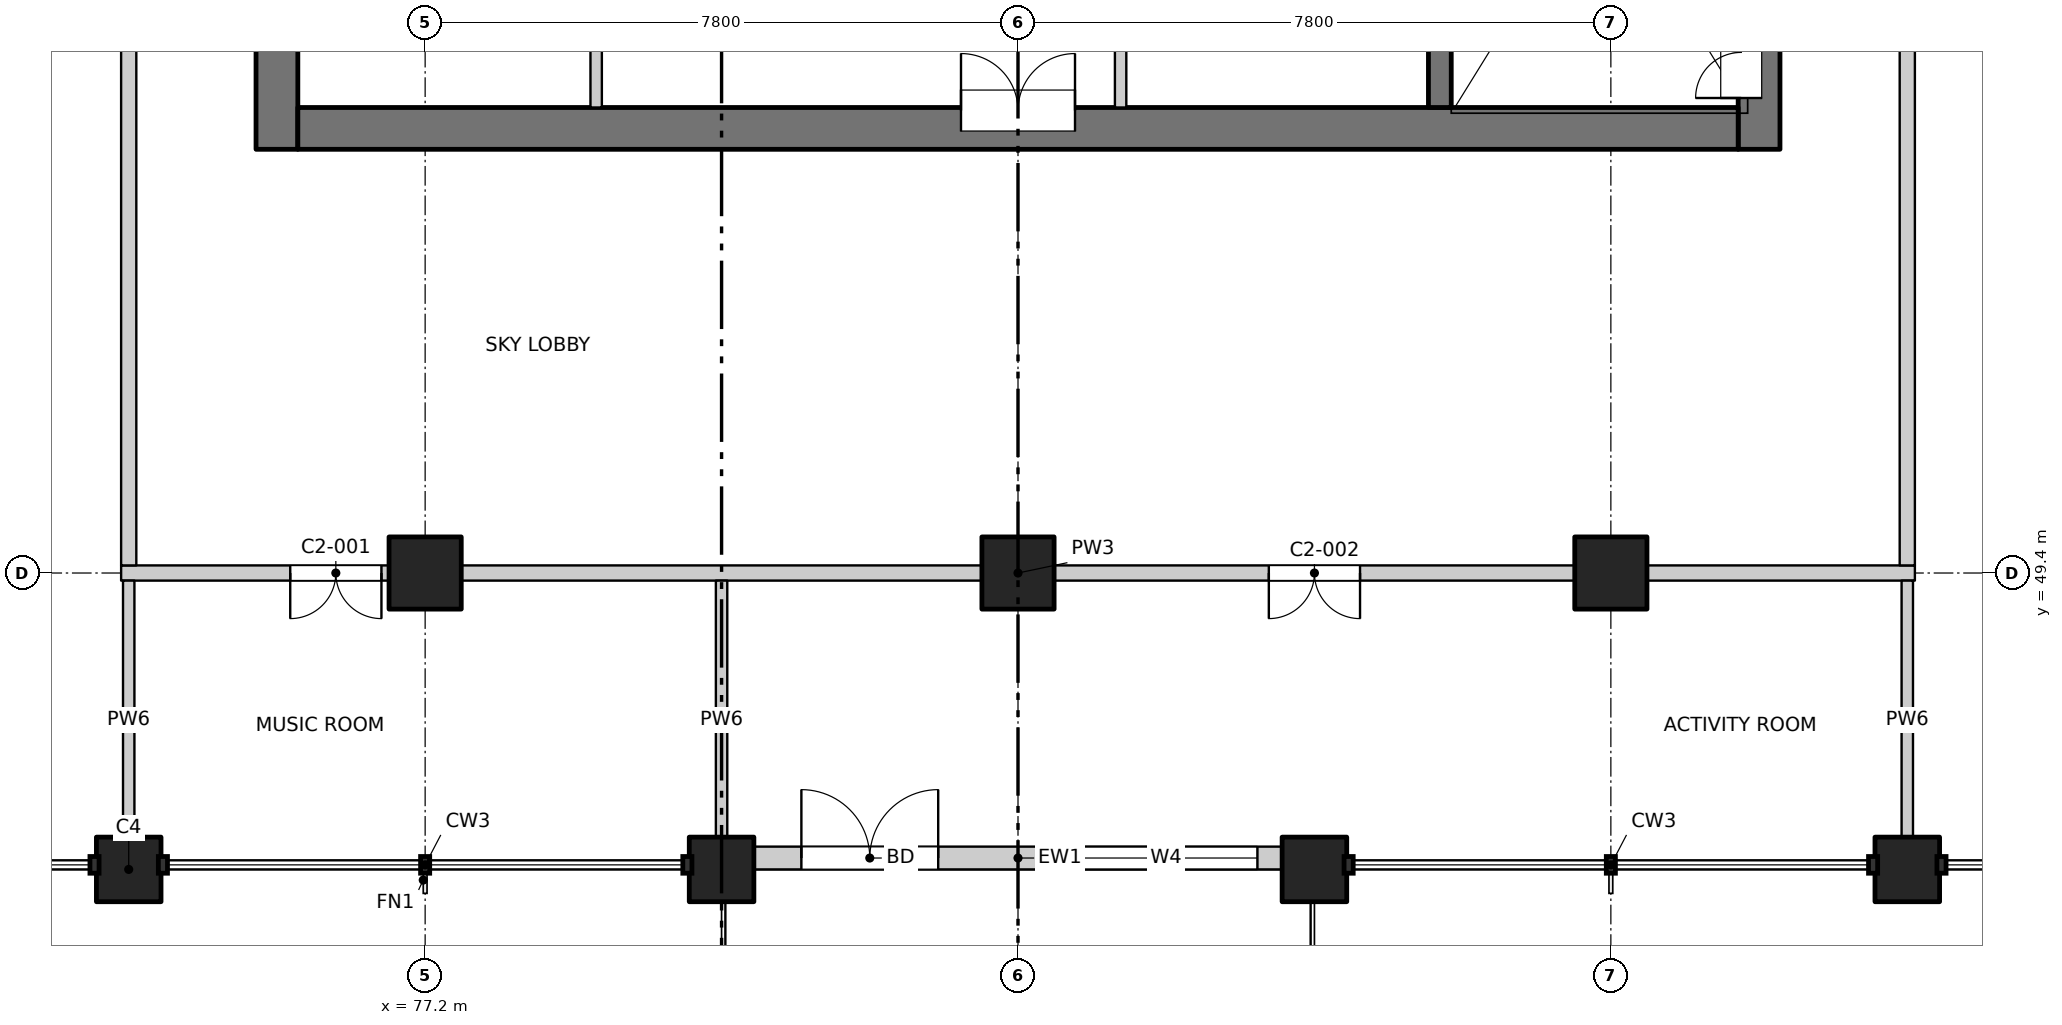
"""IFC4 building model, lengths in metres.
Left out: names, types, materials, properties, quantities, classifications, styles, units other than length and angle.
Written with IfcOpenShell. Run it as: python <this file> out.ifc"""

import sys

from ifc_helpers import new_model, si_unit, direction, frame, frame_2d, origin, origin_2d, place, context, subcontext, project, spatial, rectangle, extrude, element, fill, save


model = new_model("IFC4")
c1 = context("Model", 3, precision=1e-05, world=origin(), true_north=direction((0.0, 1.0)))
c2 = subcontext(c1, "Body", "Model", "MODEL_VIEW")
j1 = project(units=[si_unit("LENGTHUNIT", "METRE"), si_unit("PLANEANGLEUNIT", "RADIAN")], contexts=[c1])
p1 = place(None, origin())
s1 = spatial("IfcSite", under=j1, at=p1, CompositionType="ELEMENT")
p2 = place(p1, origin())
s2 = spatial("IfcBuilding", under=s1, at=p2, CompositionType="ELEMENT")
p3 = place(p2, frame((0.0, 0.0, 133.9)))
s3 = spatial("IfcBuildingStorey", under=s2, at=p3, CompositionType="ELEMENT", Elevation=133.9)
for number, where, z_axis, x_axis in (
    (1, (73.3, 45.5, -0.25), (0.0, 0.0, 1.0), (1.0, 0.0, 0.0)),
    (2, (81.1, 45.5, -0.25), (0.0, 0.0, 1.0), (1.0, 0.0, 0.0)),
    (3, (88.9, 45.5, -0.25), (0.0, 0.0, 1.0), (1.0, 0.0, 0.0)),
    (4, (96.7, 45.5, -0.25), (0.0, 0.0, 1.0), (1.0, 0.0, 0.0)),
):
    element("IfcColumn", number, at=place(p3, frame(where, z_axis=z_axis, x_axis=x_axis)), inside=s3, PredefinedType="COLUMN", context=c2, shape_type="SweptSolid", body=[
        extrude(rectangle(XDim=0.85, YDim=0.85, at=origin_2d()), origin(), (0.0, 0.0, 1.0), 3.4),
    ])
for number, where, z_axis, x_axis in (
    (5, (77.2, 49.4, -0.25), (0.0, 0.0, 1.0), (1.0, 0.0, 0.0)),
    (6, (85.0, 49.4, -0.25), (0.0, 0.0, 1.0), (1.0, 0.0, 0.0)),
    (7, (92.8, 49.4, -0.25), (0.0, 0.0, 1.0), (1.0, 0.0, 0.0)),
):
    element("IfcColumn", number, at=place(p3, frame(where, z_axis=z_axis, x_axis=x_axis)), inside=s3, PredefinedType="COLUMN", context=c2, shape_type="SweptSolid", body=[
        extrude(rectangle(XDim=0.95, YDim=0.95, at=origin_2d()), origin(), (0.0, 0.0, 1.0), 3.4),
    ])
p4 = place(p3, frame((75.25, 54.975, -0.25), z_axis=(0.0, 0.0, 1.0), x_axis=(0.0, 1.0, 0.0)))
e8 = element("IfcWall", 8, at=p4, inside=s3, PredefinedType="SOLIDWALL", context=c2, shape_type="SweptSolid", body=[
    extrude(rectangle(XDim=22.325, YDim=0.55, at=frame_2d((11.163, 0.0))), origin(), (0.0, 0.0, 1.0), 3.4),
])
p5 = place(p4, frame((7.475, 0.0, 0.25)))
e9 = element("IfcOpeningElement", 9, at=p5, cuts=e8, PredefinedType="OPENING", context=c2, shape_type="SweptSolid", body=[
    extrude(rectangle(XDim=0.9, YDim=2.1, at=frame_2d((0.45, 1.05))), frame((0.0, 0.285, 0.0), z_axis=(0.0, -1.0, 0.0), x_axis=(1.0, 0.0, 0.0)), (0.0, 0.0, 1.0), 0.57),
])
p6 = place(p4, frame((10.775, 0.0, 0.25)))
e10 = element("IfcOpeningElement", 10, at=p6, cuts=e8, PredefinedType="OPENING", context=c2, shape_type="SweptSolid", body=[
    extrude(rectangle(XDim=0.9, YDim=2.1, at=frame_2d((0.45, 1.05))), frame((0.0, 0.285, 0.0), z_axis=(0.0, -1.0, 0.0), x_axis=(1.0, 0.0, 0.0)), (0.0, 0.0, 1.0), 0.57),
])
p7 = place(p4, frame((13.775, 0.0, 0.25)))
e11 = element("IfcOpeningElement", 11, at=p7, cuts=e8, PredefinedType="OPENING", context=c2, shape_type="SweptSolid", body=[
    extrude(rectangle(XDim=0.9, YDim=2.1, at=frame_2d((0.45, 1.05))), frame((0.0, 0.285, 0.0), z_axis=(0.0, -1.0, 0.0), x_axis=(1.0, 0.0, 0.0)), (0.0, 0.0, 1.0), 0.57),
])
p8 = place(p4, frame((16.775, 0.0, 0.25)))
e12 = element("IfcOpeningElement", 12, at=p8, cuts=e8, PredefinedType="OPENING", context=c2, shape_type="SweptSolid", body=[
    extrude(rectangle(XDim=0.9, YDim=2.1, at=frame_2d((0.45, 1.05))), frame((0.0, 0.285, 0.0), z_axis=(0.0, -1.0, 0.0), x_axis=(1.0, 0.0, 0.0)), (0.0, 0.0, 1.0), 0.57),
])
p9 = place(p4, frame((20.075, 0.0, 0.25)))
e13 = element("IfcOpeningElement", 13, at=p9, cuts=e8, PredefinedType="OPENING", context=c2, shape_type="SweptSolid", body=[
    extrude(rectangle(XDim=0.9, YDim=2.1, at=frame_2d((0.45, 1.05))), frame((0.0, 0.285, 0.0), z_axis=(0.0, -1.0, 0.0), x_axis=(1.0, 0.0, 0.0)), (0.0, 0.0, 1.0), 0.57),
])
p10 = place(p3, frame((94.75, 54.975, -0.25), z_axis=(0.0, 0.0, 1.0), x_axis=(0.0, 1.0, 0.0)))
e14 = element("IfcWall", 14, at=p10, inside=s3, PredefinedType="SOLIDWALL", context=c2, shape_type="SweptSolid", body=[
    extrude(rectangle(XDim=6.975, YDim=0.55, at=frame_2d((3.487, 0.0))), origin(), (0.0, 0.0, 1.0), 3.4),
])
p11 = place(p10, frame((0.675, 0.0, 0.25)))
e15 = element("IfcOpeningElement", 15, at=p11, cuts=e14, PredefinedType="OPENING", context=c2, shape_type="SweptSolid", body=[
    extrude(rectangle(XDim=1.2, YDim=2.1, at=frame_2d((0.6, 1.05))), frame((0.0, 0.285, 0.0), z_axis=(0.0, -1.0, 0.0), x_axis=(1.0, 0.0, 0.0)), (0.0, 0.0, 1.0), 0.57),
])
p12 = place(p3, frame((75.525, 55.25, -0.25), z_axis=(0.0, 0.0, 1.0), x_axis=(1.0, 0.0, 0.0)))
e16 = element("IfcWall", 16, at=p12, inside=s3, PredefinedType="SOLIDWALL", context=c2, shape_type="SweptSolid", body=[
    extrude(rectangle(XDim=18.95, YDim=0.55, at=frame_2d((9.475, 0.0))), origin(), (0.0, 0.0, 1.0), 3.4),
])
p13 = place(p12, frame((8.725, 0.0, 0.25)))
e17 = element("IfcOpeningElement", 17, at=p13, cuts=e16, PredefinedType="OPENING", context=c2, shape_type="SweptSolid", body=[
    extrude(rectangle(XDim=1.5, YDim=2.1, at=frame_2d((0.75, 1.05))), frame((0.0, 0.285, 0.0), z_axis=(0.0, -1.0, 0.0), x_axis=(1.0, 0.0, 0.0)), (0.0, 0.0, 1.0), 0.57),
])
p14 = place(p3, frame((90.55, 55.525, -0.25), z_axis=(0.0, 0.0, 1.0), x_axis=(0.0, 1.0, 0.0)))
e18 = element("IfcWall", 18, at=p14, inside=s3, PredefinedType="SOLIDWALL", context=c2, shape_type="SweptSolid", body=[
    extrude(rectangle(XDim=6.425, YDim=0.3, at=frame_2d((3.212, 0.0))), origin(), (0.0, 0.0, 1.0), 3.4),
])
p15 = place(p3, frame((81.525, 45.65, 0.0), z_axis=(0.0, 0.0, 1.0), x_axis=(1.0, 0.0, 0.0)))
e19 = element("IfcWall", 19, at=p15, inside=s3, PredefinedType="SOLIDWALL", context=c2, shape_type="SweptSolid", body=[
    extrude(rectangle(XDim=6.95, YDim=0.3, at=frame_2d((3.475, 0.0))), origin(), (0.0, 0.0, 1.0), 2.7),
])
p16 = place(p15, frame((0.625, 0.0, 0.0)))
e20 = element("IfcOpeningElement", 20, at=p16, cuts=e19, PredefinedType="OPENING", context=c2, shape_type="SweptSolid", body=[
    extrude(rectangle(XDim=1.8, YDim=2.4, at=frame_2d((0.9, 1.2))), frame((0.0, 0.16, 0.0), z_axis=(0.0, -1.0, 0.0), x_axis=(1.0, 0.0, 0.0)), (0.0, 0.0, 1.0), 0.32),
])
p17 = place(p15, frame((4.225, 0.0, 0.6)))
e21 = element("IfcOpeningElement", 21, at=p17, cuts=e19, PredefinedType="OPENING", context=c2, shape_type="SweptSolid", body=[
    extrude(rectangle(XDim=2.4, YDim=2.1, at=frame_2d((1.2, 1.05))), frame((0.0, 0.16, 0.0), z_axis=(0.0, -1.0, 0.0), x_axis=(1.0, 0.0, 0.0)), (0.0, 0.0, 1.0), 0.32),
])
p18 = place(p3, frame((73.2, 49.4, 0.0), z_axis=(0.0, 0.0, 1.0), x_axis=(1.0, 0.0, 0.0)))
e22 = element("IfcWall", 22, at=p18, inside=s3, PredefinedType="PARTITIONING", context=c2, shape_type="SweptSolid", body=[
    extrude(rectangle(XDim=23.6, YDim=0.2, at=frame_2d((11.8, 0.0))), origin(), (0.0, 0.0, 1.0), 3.15),
])
p19 = place(p18, frame((2.225, 0.0, 0.0)))
e23 = element("IfcOpeningElement", 23, at=p19, cuts=e22, PredefinedType="OPENING", context=c2, shape_type="SweptSolid", body=[
    extrude(rectangle(XDim=1.2, YDim=2.1, at=frame_2d((0.6, 1.05))), frame((0.0, 0.11, 0.0), z_axis=(0.0, -1.0, 0.0), x_axis=(1.0, 0.0, 0.0)), (0.0, 0.0, 1.0), 0.22),
])
p20 = place(p18, frame((15.1, 0.0, 0.0)))
e24 = element("IfcOpeningElement", 24, at=p20, cuts=e22, PredefinedType="OPENING", context=c2, shape_type="SweptSolid", body=[
    extrude(rectangle(XDim=1.2, YDim=2.1, at=frame_2d((0.6, 1.05))), frame((0.0, 0.11, 0.0), z_axis=(0.0, -1.0, 0.0), x_axis=(1.0, 0.0, 0.0)), (0.0, 0.0, 1.0), 0.22),
])
p21 = place(p3, frame((73.3, 45.635, 0.0), z_axis=(0.0, 0.0, 1.0), x_axis=(0.0, 1.0, 0.0)))
e25 = element("IfcWall", 25, at=p21, inside=s3, PredefinedType="PARTITIONING", context=c2, shape_type="SweptSolid", body=[
    extrude(rectangle(XDim=3.665, YDim=0.15, at=frame_2d((1.833, 0.0))), origin(), (0.0, 0.0, 1.0), 3.15),
])
p22 = place(p3, frame((73.3, 49.5, 0.0), z_axis=(0.0, 0.0, 1.0), x_axis=(0.0, 1.0, 0.0)))
e26 = element("IfcWall", 26, at=p22, inside=s3, PredefinedType="PARTITIONING", context=c2, shape_type="SweptSolid", body=[
    extrude(rectangle(XDim=34.865, YDim=0.2, at=frame_2d((17.433, 0.0))), origin(), (0.0, 0.0, 1.0), 3.15),
])
p23 = place(p22, frame((9.05, 0.0, 0.0)))
e27 = element("IfcOpeningElement", 27, at=p23, cuts=e26, PredefinedType="OPENING", context=c2, shape_type="SweptSolid", body=[
    extrude(rectangle(XDim=1.2, YDim=2.1, at=frame_2d((0.6, 1.05))), frame((0.0, 0.11, 0.0), z_axis=(0.0, -1.0, 0.0), x_axis=(1.0, 0.0, 0.0)), (0.0, 0.0, 1.0), 0.22),
])
p24 = place(p22, frame((16.85, 0.0, 0.0)))
e28 = element("IfcOpeningElement", 28, at=p24, cuts=e26, PredefinedType="OPENING", context=c2, shape_type="SweptSolid", body=[
    extrude(rectangle(XDim=1.2, YDim=2.1, at=frame_2d((0.6, 1.05))), frame((0.0, 0.11, 0.0), z_axis=(0.0, -1.0, 0.0), x_axis=(1.0, 0.0, 0.0)), (0.0, 0.0, 1.0), 0.22),
])
p25 = place(p22, frame((24.65, 0.0, 0.0)))
e29 = element("IfcOpeningElement", 29, at=p25, cuts=e26, PredefinedType="OPENING", context=c2, shape_type="SweptSolid", body=[
    extrude(rectangle(XDim=1.2, YDim=2.1, at=frame_2d((0.6, 1.05))), frame((0.0, 0.11, 0.0), z_axis=(0.0, -1.0, 0.0), x_axis=(1.0, 0.0, 0.0)), (0.0, 0.0, 1.0), 0.22),
])
p26 = place(p3, frame((79.45, 55.525, 0.0), z_axis=(0.0, 0.0, 1.0), x_axis=(0.0, 1.0, 0.0)))
e30 = element("IfcWall", 30, at=p26, inside=s3, PredefinedType="PARTITIONING", context=c2, shape_type="SweptSolid", body=[
    extrude(rectangle(XDim=5.375, YDim=0.15, at=frame_2d((2.688, 0.0))), origin(), (0.0, 0.0, 1.0), 3.15),
])
p27 = place(p26, frame((2.175, 0.0, 0.0)))
e31 = element("IfcOpeningElement", 31, at=p27, cuts=e30, PredefinedType="OPENING", context=c2, shape_type="SweptSolid", body=[
    extrude(rectangle(XDim=0.9, YDim=2.1, at=frame_2d((0.45, 1.05))), frame((0.0, 0.085, 0.0), z_axis=(0.0, -1.0, 0.0), x_axis=(1.0, 0.0, 0.0)), (0.0, 0.0, 1.0), 0.17),
])
p28 = place(p3, frame((81.1, 45.635, 0.0), z_axis=(0.0, 0.0, 1.0), x_axis=(0.0, 1.0, 0.0)))
e32 = element("IfcWall", 32, at=p28, inside=s3, PredefinedType="PARTITIONING", context=c2, shape_type="SweptSolid", body=[
    extrude(rectangle(XDim=3.665, YDim=0.15, at=frame_2d((1.833, 0.0))), origin(), (0.0, 0.0, 1.0), 2.55),
])
p29 = place(p3, frame((86.35, 55.525, 0.0), z_axis=(0.0, 0.0, 1.0), x_axis=(0.0, 1.0, 0.0)))
e33 = element("IfcWall", 33, at=p29, inside=s3, PredefinedType="PARTITIONING", context=c2, shape_type="SweptSolid", body=[
    extrude(rectangle(XDim=5.5, YDim=0.15, at=frame_2d((2.75, 0.0))), origin(), (0.0, 0.0, 1.0), 3.15),
])
p30 = place(p29, frame((2.175, 0.0, 0.0)))
e34 = element("IfcOpeningElement", 34, at=p30, cuts=e33, PredefinedType="OPENING", context=c2, shape_type="SweptSolid", body=[
    extrude(rectangle(XDim=0.9, YDim=2.1, at=frame_2d((0.45, 1.05))), frame((0.0, 0.085, 0.0), z_axis=(0.0, -1.0, 0.0), x_axis=(1.0, 0.0, 0.0)), (0.0, 0.0, 1.0), 0.17),
])
p31 = place(p3, frame((96.7, 45.635, 0.0), z_axis=(0.0, 0.0, 1.0), x_axis=(0.0, 1.0, 0.0)))
e35 = element("IfcWall", 35, at=p31, inside=s3, PredefinedType="PARTITIONING", context=c2, shape_type="SweptSolid", body=[
    extrude(rectangle(XDim=3.665, YDim=0.15, at=frame_2d((1.833, 0.0))), origin(), (0.0, 0.0, 1.0), 3.15),
])
p32 = place(p3, frame((96.7, 49.5, 0.0), z_axis=(0.0, 0.0, 1.0), x_axis=(0.0, 1.0, 0.0)))
e36 = element("IfcWall", 36, at=p32, inside=s3, PredefinedType="PARTITIONING", context=c2, shape_type="SweptSolid", body=[
    extrude(rectangle(XDim=34.865, YDim=0.2, at=frame_2d((17.433, 0.0))), origin(), (0.0, 0.0, 1.0), 3.15),
])
p33 = place(p32, frame((9.05, 0.0, 0.0)))
e37 = element("IfcOpeningElement", 37, at=p33, cuts=e36, PredefinedType="OPENING", context=c2, shape_type="SweptSolid", body=[
    extrude(rectangle(XDim=1.2, YDim=2.1, at=frame_2d((0.6, 1.05))), frame((0.0, 0.11, 0.0), z_axis=(0.0, -1.0, 0.0), x_axis=(1.0, 0.0, 0.0)), (0.0, 0.0, 1.0), 0.22),
])
p34 = place(p32, frame((12.95, 0.0, 0.0)))
e38 = element("IfcOpeningElement", 38, at=p34, cuts=e36, PredefinedType="OPENING", context=c2, shape_type="SweptSolid", body=[
    extrude(rectangle(XDim=1.2, YDim=2.1, at=frame_2d((0.6, 1.05))), frame((0.0, 0.11, 0.0), z_axis=(0.0, -1.0, 0.0), x_axis=(1.0, 0.0, 0.0)), (0.0, 0.0, 1.0), 0.22),
])
p35 = place(p32, frame((28.55, 0.0, 0.0)))
e39 = element("IfcOpeningElement", 39, at=p35, cuts=e36, PredefinedType="OPENING", context=c2, shape_type="SweptSolid", body=[
    extrude(rectangle(XDim=1.2, YDim=2.1, at=frame_2d((0.6, 1.05))), frame((0.0, 0.11, 0.0), z_axis=(0.0, -1.0, 0.0), x_axis=(1.0, 0.0, 0.0)), (0.0, 0.0, 1.0), 0.22),
])
p36 = place(p16, origin())
e40 = element("IfcDoor", 40, at=p36, inside=s3, OperationType="DOUBLE_DOOR_SINGLE_SWING", PredefinedType="DOOR", context=c2, shape_type="SweptSolid", body=[
    extrude(rectangle(XDim=1.8, YDim=2.4, at=frame_2d((0.9, 1.2))), frame((0.0, 0.025, 0.0), z_axis=(0.0, -1.0, 0.0), x_axis=(1.0, 0.0, 0.0)), (0.0, 0.0, 1.0), 0.05),
])
fill(e20, e40)
p37 = place(p17, origin())
e41 = element("IfcWindow", 41, at=p37, inside=s3, PartitioningType="SINGLE_PANEL", PredefinedType="WINDOW", context=c2, shape_type="SweptSolid", body=[
    extrude(rectangle(XDim=2.4, YDim=2.1, at=frame_2d((1.2, 1.05))), frame((0.0, 0.03, 0.0), z_axis=(0.0, -1.0, 0.0), x_axis=(1.0, 0.0, 0.0)), (0.0, 0.0, 1.0), 0.06),
])
fill(e21, e41)
p38 = place(p19, origin())
e42 = element("IfcDoor", 42, at=p38, inside=s3, OperationType="DOUBLE_DOOR_SINGLE_SWING", PredefinedType="DOOR", context=c2, shape_type="SweptSolid", body=[
    extrude(rectangle(XDim=1.2, YDim=2.1, at=frame_2d((0.6, 1.05))), frame((0.0, 0.025, 0.0), z_axis=(0.0, -1.0, 0.0), x_axis=(1.0, 0.0, 0.0)), (0.0, 0.0, 1.0), 0.05),
])
fill(e23, e42)
p39 = place(p20, origin())
e43 = element("IfcDoor", 43, at=p39, inside=s3, OperationType="DOUBLE_DOOR_SINGLE_SWING", PredefinedType="DOOR", context=c2, shape_type="SweptSolid", body=[
    extrude(rectangle(XDim=1.2, YDim=2.1, at=frame_2d((0.6, 1.05))), frame((0.0, 0.025, 0.0), z_axis=(0.0, -1.0, 0.0), x_axis=(1.0, 0.0, 0.0)), (0.0, 0.0, 1.0), 0.05),
])
fill(e24, e43)
p40 = place(p13, origin())
e44 = element("IfcDoor", 44, at=p40, inside=s3, OperationType="DOUBLE_DOOR_SINGLE_SWING", PredefinedType="DOOR", context=c2, shape_type="SweptSolid", body=[
    extrude(rectangle(XDim=1.5, YDim=2.1, at=frame_2d((0.75, 1.05))), frame((0.0, 0.26, 0.0), z_axis=(0.0, -1.0, 0.0), x_axis=(1.0, 0.0, 0.0)), (0.0, 0.0, 1.0), 0.05),
])
fill(e17, e44)
p41 = place(p11, origin())
e45 = element("IfcDoor", 45, at=p41, inside=s3, OperationType="DOUBLE_DOOR_SINGLE_SWING", PredefinedType="DOOR", context=c2, shape_type="SweptSolid", body=[
    extrude(rectangle(XDim=1.2, YDim=2.1, at=frame_2d((0.6, 1.05))), frame((0.0, 0.26, 0.0), z_axis=(0.0, -1.0, 0.0), x_axis=(1.0, 0.0, 0.0)), (0.0, 0.0, 1.0), 0.05),
])
fill(e15, e45)
save(model, sys.argv[1])
